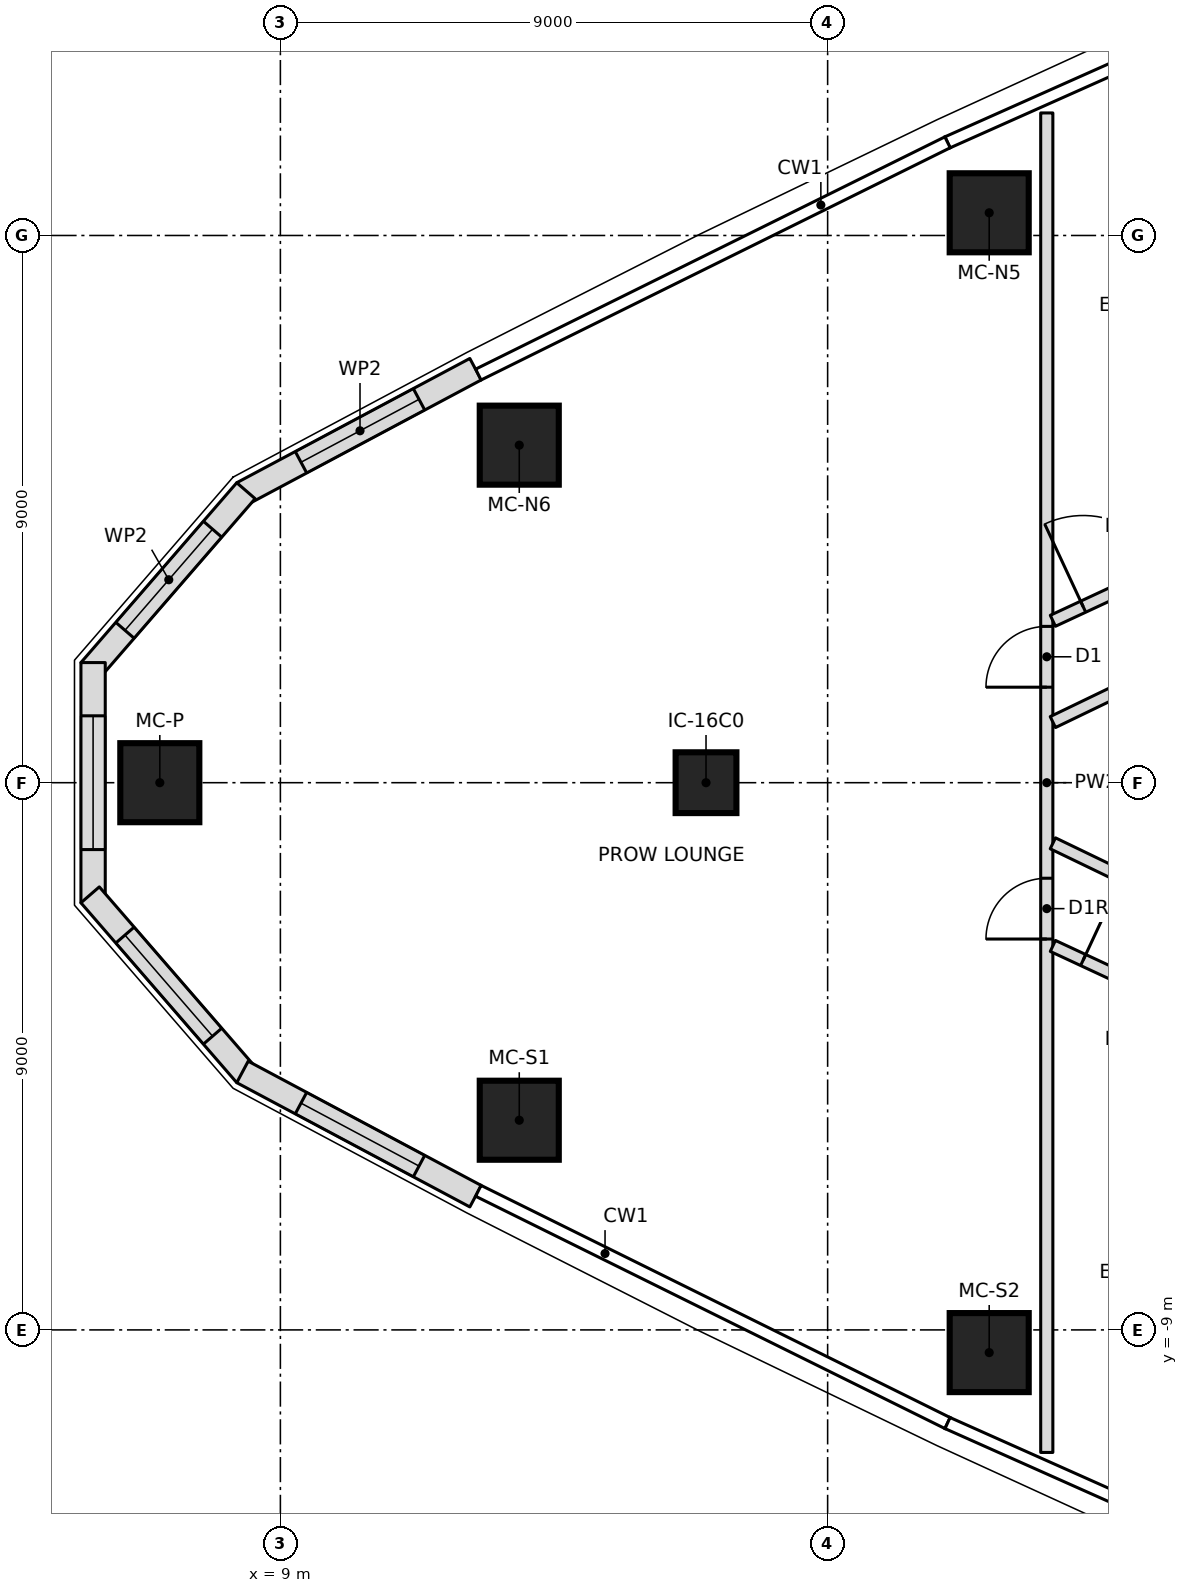
"""IFC4 building model, lengths in metres.
Left out: names, types, materials, properties, quantities, classifications, styles, units other than length and angle.
Written with IfcOpenShell. Run it as: python <this file> out.ifc"""

import sys

from ifc_helpers import new_model, si_unit, direction, frame, frame_2d, origin, origin_2d, place, context, subcontext, project, spatial, polyline, rectangle, outline, extrude, element, fill, save


model = new_model("IFC4")
c1 = context("Model", 3, precision=1e-05, world=origin(), true_north=direction((0.0, 1.0)))
c2 = subcontext(c1, "Body", "Model", "MODEL_VIEW")
j1 = project(units=[si_unit("LENGTHUNIT", "METRE"), si_unit("PLANEANGLEUNIT", "RADIAN")], contexts=[c1])
p1 = place(None, origin())
s1 = spatial("IfcSite", under=j1, at=p1, CompositionType="ELEMENT")
p2 = place(p1, origin())
s2 = spatial("IfcBuilding", under=s1, at=p2, CompositionType="ELEMENT")
p3 = place(p2, frame((0.0, 0.0, 200.35)))
s3 = spatial("IfcBuildingStorey", under=s2, at=p3, CompositionType="ELEMENT", Elevation=200.35)
for number, where, z_axis, x_axis in (
    (1, (7.017, 0.0, 0.0), (0.0, 0.0, 1.0), (1.0, 0.0, 0.0)),
    (2, (12.929, -5.552, 0.0), (0.0, 0.0, 1.0), (1.0, 0.0, 0.0)),
    (3, (20.657, -9.373, 0.0), (0.0, 0.0, 1.0), (1.0, 0.0, 0.0)),
    (4, (20.657, 9.373, 0.0), (0.0, 0.0, 1.0), (1.0, 0.0, 0.0)),
    (5, (12.929, 5.552, 0.0), (0.0, 0.0, 1.0), (1.0, 0.0, 0.0)),
):
    element("IfcColumn", number, at=place(p3, frame(where, z_axis=z_axis, x_axis=x_axis)), inside=s3, PredefinedType="COLUMN", context=c2, shape_type="SweptSolid", body=[
        extrude(rectangle(XDim=1.3, YDim=1.3, at=origin_2d()), origin(), (0.0, 0.0, 1.0), 3.55),
    ])
p4 = place(p3, frame((16.0, 0.0, 0.0), z_axis=(0.0, 0.0, 1.0), x_axis=(1.0, 0.0, 0.0)))
e6 = element("IfcColumn", 6, at=p4, inside=s3, PredefinedType="COLUMN", context=c2, shape_type="SweptSolid", body=[
    extrude(rectangle(XDim=1.0, YDim=1.0, at=origin_2d()), origin(), (0.0, 0.0, 1.0), 3.55),
])
p5 = place(p3, frame((12.21, 6.801, 0.0), z_axis=(0.0, 0.0, 1.0), x_axis=(-0.882385889746, -0.470526451518, 0.0)))
e7 = element("IfcWall", 7, at=p5, inside=s3, PredefinedType="NOTDEFINED", context=c2, shape_type="SweptSolid", body=[
    extrude(outline(polyline([(0.0, -0.2), (4.344, -0.2), (4.27, 0.2), (0.0, 0.2), (0.0, -0.2)])), origin(), (0.0, 0.0, 1.0), 3.25),
])
p6 = place(p5, frame((1.053, 0.0, 0.6)))
e8 = element("IfcOpeningElement", 8, at=p6, cuts=e7, PredefinedType="OPENING", context=c2, shape_type="SweptSolid", body=[
    extrude(outline(polyline([(0.0, 1.35), (0.084, 1.771), (0.322, 2.128), (0.679, 2.366), (1.1, 2.45), (1.521, 2.366), (1.878, 2.128), (2.116, 1.771), (2.2, 1.35), (2.2, 1.1), (2.116, 0.679), (1.878, 0.322), (1.521, 0.084), (1.1, 0.0), (0.679, 0.084), (0.322, 0.322), (0.084, 0.679), (0.0, 1.1), (0.0, 1.35)])), frame((0.0, 0.21, 0.0), z_axis=(0.0, -1.0, 0.0), x_axis=(1.0, 0.0, 0.0)), (0.0, 0.0, 1.0), 0.42),
])
p7 = place(p3, frame((8.409, 4.774, 0.0), z_axis=(0.0, 0.0, 1.0), x_axis=(-0.654759384203, -0.755837382509, 0.0)))
e9 = element("IfcWall", 9, at=p7, inside=s3, PredefinedType="NOTDEFINED", context=c2, shape_type="SweptSolid", body=[
    extrude(outline(polyline([(-0.037, -0.2), (3.876, -0.2), (3.727, 0.2), (0.037, 0.2), (-0.037, -0.2)])), origin(), (0.0, 0.0, 1.0), 3.25),
])
p8 = place(p7, frame((0.801, 0.0, 0.6)))
e10 = element("IfcOpeningElement", 10, at=p8, cuts=e9, PredefinedType="OPENING", context=c2, shape_type="SweptSolid", body=[
    extrude(outline(polyline([(0.0, 1.35), (0.084, 1.771), (0.322, 2.128), (0.679, 2.366), (1.1, 2.45), (1.521, 2.366), (1.878, 2.128), (2.116, 1.771), (2.2, 1.35), (2.2, 1.1), (2.116, 0.679), (1.878, 0.322), (1.521, 0.084), (1.1, 0.0), (0.679, 0.084), (0.322, 0.322), (0.084, 0.679), (0.0, 1.1), (0.0, 1.35)])), frame((0.0, 0.21, 0.0), z_axis=(0.0, -1.0, 0.0), x_axis=(1.0, 0.0, 0.0)), (0.0, 0.0, 1.0), 0.42),
])
p9 = place(p3, frame((5.92, 1.901, 0.0), z_axis=(0.0, 0.0, 1.0), x_axis=(0.0, -1.0, 0.0)))
e11 = element("IfcWall", 11, at=p9, inside=s3, PredefinedType="NOTDEFINED", context=c2, shape_type="SweptSolid", body=[
    extrude(outline(polyline([(-0.075, -0.2), (3.876, -0.2), (3.727, 0.2), (0.075, 0.2), (-0.075, -0.2)])), origin(), (0.0, 0.0, 1.0), 3.25),
])
p10 = place(p9, frame((0.801, 0.0, 0.6)))
e12 = element("IfcOpeningElement", 12, at=p10, cuts=e11, PredefinedType="OPENING", context=c2, shape_type="SweptSolid", body=[
    extrude(outline(polyline([(0.0, 1.35), (0.084, 1.771), (0.322, 2.128), (0.679, 2.366), (1.1, 2.45), (1.521, 2.366), (1.878, 2.128), (2.116, 1.771), (2.2, 1.35), (2.2, 1.1), (2.116, 0.679), (1.878, 0.322), (1.521, 0.084), (1.1, 0.0), (0.679, 0.084), (0.322, 0.322), (0.084, 0.679), (0.0, 1.1), (0.0, 1.35)])), frame((0.0, 0.21, 0.0), z_axis=(0.0, -1.0, 0.0), x_axis=(1.0, 0.0, 0.0)), (0.0, 0.0, 1.0), 0.42),
])
p11 = place(p3, frame((5.92, -1.901, 0.0), z_axis=(0.0, 0.0, 1.0), x_axis=(0.654759384203, -0.755837382509, 0.0)))
e13 = element("IfcWall", 13, at=p11, inside=s3, PredefinedType="NOTDEFINED", context=c2, shape_type="SweptSolid", body=[
    extrude(outline(polyline([(-0.075, -0.2), (3.839, -0.2), (3.765, 0.2), (0.075, 0.2), (-0.075, -0.2)])), origin(), (0.0, 0.0, 1.0), 3.25),
])
p12 = place(p11, frame((0.801, 0.0, 0.6)))
e14 = element("IfcOpeningElement", 14, at=p12, cuts=e13, PredefinedType="OPENING", context=c2, shape_type="SweptSolid", body=[
    extrude(outline(polyline([(0.0, 1.35), (0.084, 1.771), (0.322, 2.128), (0.679, 2.366), (1.1, 2.45), (1.521, 2.366), (1.878, 2.128), (2.116, 1.771), (2.2, 1.35), (2.2, 1.1), (2.116, 0.679), (1.878, 0.322), (1.521, 0.084), (1.1, 0.0), (0.679, 0.084), (0.322, 0.322), (0.084, 0.679), (0.0, 1.1), (0.0, 1.35)])), frame((0.0, 0.21, 0.0), z_axis=(0.0, -1.0, 0.0), x_axis=(1.0, 0.0, 0.0)), (0.0, 0.0, 1.0), 0.42),
])
p13 = place(p3, frame((8.409, -4.774, 0.0), z_axis=(0.0, 0.0, 1.0), x_axis=(0.882385889746, -0.470526451518, 0.0)))
e15 = element("IfcWall", 15, at=p13, inside=s3, PredefinedType="NOTDEFINED", context=c2, shape_type="SweptSolid", body=[
    extrude(outline(polyline([(-0.037, -0.2), (4.307, -0.2), (4.307, 0.2), (0.037, 0.2), (-0.037, -0.2)])), origin(), (0.0, 0.0, 1.0), 3.25),
])
p14 = place(p13, frame((1.053, 0.0, 0.6)))
e16 = element("IfcOpeningElement", 16, at=p14, cuts=e15, PredefinedType="OPENING", context=c2, shape_type="SweptSolid", body=[
    extrude(outline(polyline([(0.0, 1.35), (0.084, 1.771), (0.322, 2.128), (0.679, 2.366), (1.1, 2.45), (1.521, 2.366), (1.878, 2.128), (2.116, 1.771), (2.2, 1.35), (2.2, 1.1), (2.116, 0.679), (1.878, 0.322), (1.521, 0.084), (1.1, 0.0), (0.679, 0.084), (0.322, 0.322), (0.084, 0.679), (0.0, 1.1), (0.0, 1.35)])), frame((0.0, 0.21, 0.0), z_axis=(0.0, -1.0, 0.0), x_axis=(1.0, 0.0, 0.0)), (0.0, 0.0, 1.0), 0.42),
])
p15 = place(p3, frame((21.604, -11.015, 0.0), z_axis=(0.0, 0.0, 1.0), x_axis=(0.0, 1.0, 0.0)))
e17 = element("IfcWall", 17, at=p15, inside=s3, PredefinedType="PARTITIONING", context=c2, shape_type="SweptSolid", body=[
    extrude(rectangle(XDim=22.031, YDim=0.2, at=frame_2d((11.015, 0.0))), origin(), (0.0, 0.0, 1.0), 3.25),
])
p16 = place(p15, frame((12.586, 0.0, 0.0)))
e18 = element("IfcOpeningElement", 18, at=p16, cuts=e17, PredefinedType="OPENING", context=c2, shape_type="SweptSolid", body=[
    extrude(rectangle(XDim=1.0, YDim=2.1, at=frame_2d((0.5, 1.05))), frame((0.0, 0.11, 0.0), z_axis=(0.0, -1.0, 0.0), x_axis=(1.0, 0.0, 0.0)), (0.0, 0.0, 1.0), 0.22),
])
p17 = place(p15, frame((8.444, 0.0, 0.0)))
e19 = element("IfcOpeningElement", 19, at=p17, cuts=e17, PredefinedType="OPENING", context=c2, shape_type="SweptSolid", body=[
    extrude(rectangle(XDim=1.0, YDim=2.1, at=frame_2d((0.5, 1.05))), frame((0.0, 0.11, 0.0), z_axis=(0.0, -1.0, 0.0), x_axis=(1.0, 0.0, 0.0)), (0.0, 0.0, 1.0), 0.22),
])
p18 = place(p3, frame((21.704, 2.663, 0.0), z_axis=(0.0, 0.0, 1.0), x_axis=(0.906619470853, 0.421949209112, 0.0)))
e20 = element("IfcWall", 20, at=p18, inside=s3, PredefinedType="PARTITIONING", context=c2, shape_type="SweptSolid", body=[
    extrude(rectangle(XDim=5.854, YDim=0.2, at=frame_2d((2.927, 0.0))), origin(), (0.0, 0.0, 1.0), 3.25),
])
p19 = place(p18, frame((0.55, 0.0, 0.0)))
e21 = element("IfcOpeningElement", 21, at=p19, cuts=e20, PredefinedType="OPENING", context=c2, shape_type="SweptSolid", body=[
    extrude(rectangle(XDim=1.5, YDim=2.1, at=frame_2d((0.75, 1.05))), frame((0.0, 0.11, 0.0), z_axis=(0.0, -1.0, 0.0), x_axis=(1.0, 0.0, 0.0)), (0.0, 0.0, 1.0), 0.22),
])
p20 = place(p3, frame((21.704, -2.685, 0.0), z_axis=(0.0, 0.0, 1.0), x_axis=(0.906628613993, -0.421929563184, 0.0)))
e22 = element("IfcWall", 22, at=p20, inside=s3, PredefinedType="PARTITIONING", context=c2, shape_type="SweptSolid", body=[
    extrude(rectangle(XDim=5.846, YDim=0.2, at=frame_2d((2.923, 0.0))), origin(), (0.0, 0.0, 1.0), 3.25),
])
p21 = place(p20, frame((0.55, 0.0, 0.0)))
e23 = element("IfcOpeningElement", 23, at=p21, cuts=e22, PredefinedType="OPENING", context=c2, shape_type="SweptSolid", body=[
    extrude(rectangle(XDim=1.5, YDim=2.1, at=frame_2d((0.75, 1.05))), frame((0.0, 0.11, 0.0), z_axis=(0.0, -1.0, 0.0), x_axis=(1.0, 0.0, 0.0)), (0.0, 0.0, 1.0), 0.22),
])
for number, where, z_axis, x_axis in (
    (24, (23.947, -2.079, 0.0), (0.0, 0.0, 1.0), (-0.901, 0.435, 0.0)),
    (25, (21.704, 0.997, 0.0), (0.0, 0.0, 1.0), (0.901, 0.435, 0.0)),
):
    element("IfcWall", number, at=place(p3, frame(where, z_axis=z_axis, x_axis=x_axis)), inside=s3, PredefinedType="PARTITIONING", context=c2, shape_type="SweptSolid", body=[
        extrude(rectangle(XDim=2.49, YDim=0.2, at=frame_2d((1.245, 0.0))), origin(), (0.0, 0.0, 1.0), 3.25),
    ])
p22 = place(p6, origin())
e26 = element("IfcWindow", 26, at=p22, inside=s3, PartitioningType="SINGLE_PANEL", PredefinedType="WINDOW", context=c2, shape_type="SweptSolid", body=[
    extrude(outline(polyline([(0.0, 1.35), (0.084, 1.771), (0.322, 2.128), (0.679, 2.366), (1.1, 2.45), (1.521, 2.366), (1.878, 2.128), (2.116, 1.771), (2.2, 1.35), (2.2, 1.1), (2.116, 0.679), (1.878, 0.322), (1.521, 0.084), (1.1, 0.0), (0.679, 0.084), (0.322, 0.322), (0.084, 0.679), (0.0, 1.1), (0.0, 1.35)])), frame((0.0, 0.17, 0.0), z_axis=(0.0, -1.0, 0.0), x_axis=(1.0, 0.0, 0.0)), (0.0, 0.0, 1.0), 0.06),
])
fill(e8, e26)
p23 = place(p8, origin())
e27 = element("IfcWindow", 27, at=p23, inside=s3, PartitioningType="SINGLE_PANEL", PredefinedType="WINDOW", context=c2, shape_type="SweptSolid", body=[
    extrude(outline(polyline([(0.0, 1.35), (0.084, 1.771), (0.322, 2.128), (0.679, 2.366), (1.1, 2.45), (1.521, 2.366), (1.878, 2.128), (2.116, 1.771), (2.2, 1.35), (2.2, 1.1), (2.116, 0.679), (1.878, 0.322), (1.521, 0.084), (1.1, 0.0), (0.679, 0.084), (0.322, 0.322), (0.084, 0.679), (0.0, 1.1), (0.0, 1.35)])), frame((0.0, 0.17, 0.0), z_axis=(0.0, -1.0, 0.0), x_axis=(1.0, 0.0, 0.0)), (0.0, 0.0, 1.0), 0.06),
])
fill(e10, e27)
p24 = place(p10, origin())
e28 = element("IfcWindow", 28, at=p24, inside=s3, PartitioningType="SINGLE_PANEL", PredefinedType="WINDOW", context=c2, shape_type="SweptSolid", body=[
    extrude(outline(polyline([(0.0, 1.35), (0.084, 1.771), (0.322, 2.128), (0.679, 2.366), (1.1, 2.45), (1.521, 2.366), (1.878, 2.128), (2.116, 1.771), (2.2, 1.35), (2.2, 1.1), (2.116, 0.679), (1.878, 0.322), (1.521, 0.084), (1.1, 0.0), (0.679, 0.084), (0.322, 0.322), (0.084, 0.679), (0.0, 1.1), (0.0, 1.35)])), frame((0.0, 0.17, 0.0), z_axis=(0.0, -1.0, 0.0), x_axis=(1.0, 0.0, 0.0)), (0.0, 0.0, 1.0), 0.06),
])
fill(e12, e28)
p25 = place(p12, origin())
e29 = element("IfcWindow", 29, at=p25, inside=s3, PartitioningType="SINGLE_PANEL", PredefinedType="WINDOW", context=c2, shape_type="SweptSolid", body=[
    extrude(outline(polyline([(0.0, 1.35), (0.084, 1.771), (0.322, 2.128), (0.679, 2.366), (1.1, 2.45), (1.521, 2.366), (1.878, 2.128), (2.116, 1.771), (2.2, 1.35), (2.2, 1.1), (2.116, 0.679), (1.878, 0.322), (1.521, 0.084), (1.1, 0.0), (0.679, 0.084), (0.322, 0.322), (0.084, 0.679), (0.0, 1.1), (0.0, 1.35)])), frame((0.0, 0.17, 0.0), z_axis=(0.0, -1.0, 0.0), x_axis=(1.0, 0.0, 0.0)), (0.0, 0.0, 1.0), 0.06),
])
fill(e14, e29)
p26 = place(p14, origin())
e30 = element("IfcWindow", 30, at=p26, inside=s3, PartitioningType="SINGLE_PANEL", PredefinedType="WINDOW", context=c2, shape_type="SweptSolid", body=[
    extrude(outline(polyline([(0.0, 1.35), (0.084, 1.771), (0.322, 2.128), (0.679, 2.366), (1.1, 2.45), (1.521, 2.366), (1.878, 2.128), (2.116, 1.771), (2.2, 1.35), (2.2, 1.1), (2.116, 0.679), (1.878, 0.322), (1.521, 0.084), (1.1, 0.0), (0.679, 0.084), (0.322, 0.322), (0.084, 0.679), (0.0, 1.1), (0.0, 1.35)])), frame((0.0, 0.17, 0.0), z_axis=(0.0, -1.0, 0.0), x_axis=(1.0, 0.0, 0.0)), (0.0, 0.0, 1.0), 0.06),
])
fill(e16, e30)
p27 = place(p16, origin())
e31 = element("IfcDoor", 31, at=p27, inside=s3, OperationType="SINGLE_SWING_LEFT", PredefinedType="DOOR", context=c2, shape_type="SweptSolid", body=[
    extrude(rectangle(XDim=1.0, YDim=2.1, at=frame_2d((0.5, 1.05))), frame((0.0, 0.025, 0.0), z_axis=(0.0, -1.0, 0.0), x_axis=(1.0, 0.0, 0.0)), (0.0, 0.0, 1.0), 0.05),
])
fill(e18, e31)
p28 = place(p17, origin())
e32 = element("IfcDoor", 32, at=p28, inside=s3, OperationType="SINGLE_SWING_RIGHT", PredefinedType="DOOR", context=c2, shape_type="SweptSolid", body=[
    extrude(rectangle(XDim=1.0, YDim=2.1, at=frame_2d((0.5, 1.05))), frame((0.0, 0.025, 0.0), z_axis=(0.0, -1.0, 0.0), x_axis=(1.0, 0.0, 0.0)), (0.0, 0.0, 1.0), 0.05),
])
fill(e19, e32)
p29 = place(p19, origin())
e33 = element("IfcDoor", 33, at=p29, inside=s3, OperationType="DOUBLE_DOOR_SINGLE_SWING", PredefinedType="DOOR", context=c2, shape_type="SweptSolid", body=[
    extrude(rectangle(XDim=1.5, YDim=2.1, at=frame_2d((0.75, 1.05))), frame((0.0, 0.025, 0.0), z_axis=(0.0, -1.0, 0.0), x_axis=(1.0, 0.0, 0.0)), (0.0, 0.0, 1.0), 0.05),
])
fill(e21, e33)
p30 = place(p21, origin())
e34 = element("IfcDoor", 34, at=p30, inside=s3, OperationType="DOUBLE_DOOR_SINGLE_SWING", PredefinedType="DOOR", context=c2, shape_type="SweptSolid", body=[
    extrude(rectangle(XDim=1.5, YDim=2.1, at=frame_2d((0.75, 1.05))), frame((0.0, 0.025, 0.0), z_axis=(0.0, -1.0, 0.0), x_axis=(1.0, 0.0, 0.0)), (0.0, 0.0, 1.0), 0.05),
])
fill(e23, e34)
save(model, sys.argv[1])
